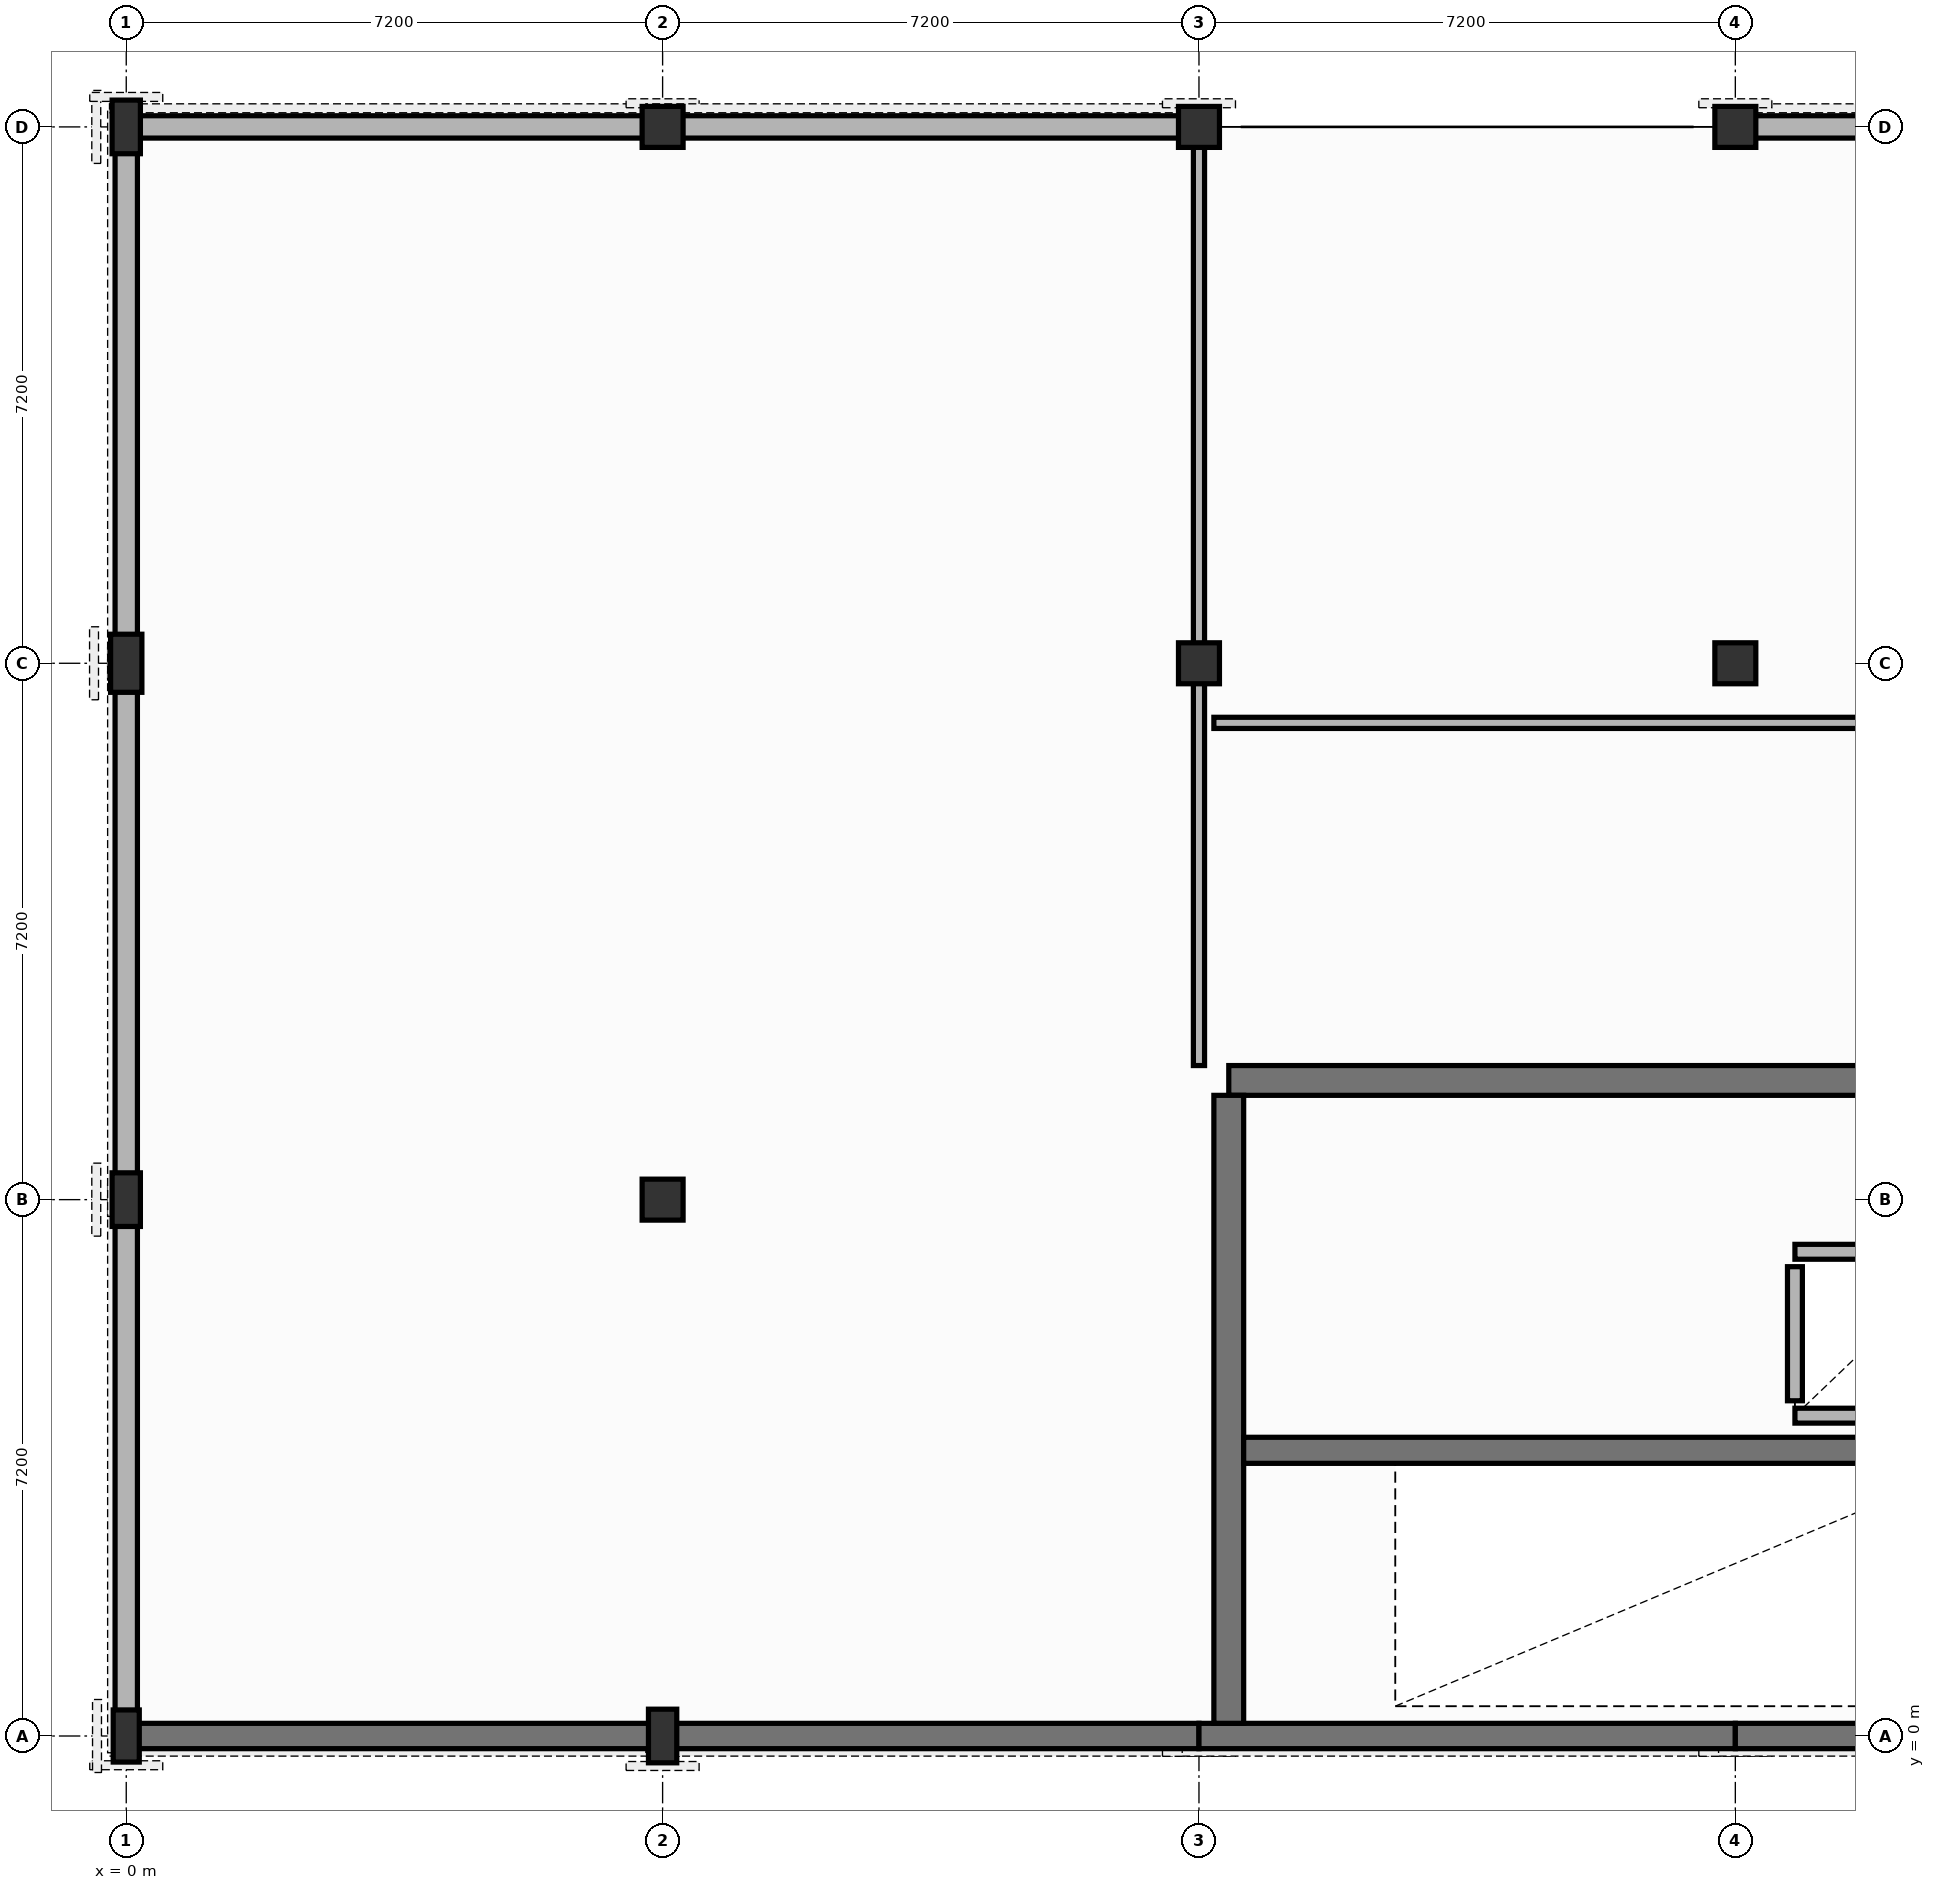
"""IFC4 building model, lengths in metres.
Left out: names, types, materials, properties, quantities, classifications, styles, units other than length and angle.
Written with IfcOpenShell. Run it as: python <this file> out.ifc"""

import sys

from ifc_helpers import new_model, si_unit, direction, frame, frame_2d, origin, origin_with_axes, origin_2d, place, context, subcontext, project, spatial, rectangle, extrude, element, fill, save


model = new_model("IFC4")
c1 = context("Model", 3, precision=1e-05, world=origin(), true_north=direction((0.0, 1.0)))
c2 = subcontext(c1, "Body", "Model", "MODEL_VIEW")
j1 = project(units=[si_unit("LENGTHUNIT", "METRE"), si_unit("PLANEANGLEUNIT", "RADIAN")], contexts=[c1])
p1 = place(None, origin())
s1 = spatial("IfcSite", under=j1, at=p1, CompositionType="ELEMENT")
p2 = place(p1, origin())
s2 = spatial("IfcBuilding", under=s1, at=p2, CompositionType="ELEMENT")
p3 = place(p2, frame((0.0, 0.0, 12.78)))
s3 = spatial("IfcBuildingStorey", under=s2, at=p3, CompositionType="ELEMENT", Elevation=12.78)
p4 = place(p3, frame((0.0, 0.0, 0.0), z_axis=(0.0, 0.0, 1.0), x_axis=(0.0, 1.0, 0.0)))
e1 = element("IfcColumn", 1, at=p4, inside=s3, PredefinedType="PILASTER", context=c2, shape_type="SweptSolid", body=[
    extrude(rectangle(XDim=0.35, YDim=0.7, at=origin_2d()), origin(), (0.0, 0.0, 1.0), 3.74),
])
p5 = place(p3, frame((0.0, 7.2, 0.0), z_axis=(0.0, 0.0, 1.0), x_axis=(1.0, 0.0, 0.0)))
e2 = element("IfcColumn", 2, at=p5, inside=s3, PredefinedType="PILASTER", context=c2, shape_type="SweptSolid", body=[
    extrude(rectangle(XDim=0.38, YDim=0.72, at=origin_2d()), origin(), (0.0, 0.0, 1.0), 3.74),
])
p6 = place(p3, frame((0.0, 14.4, 0.0), z_axis=(0.0, 0.0, 1.0), x_axis=(1.0, 0.0, 0.0)))
e3 = element("IfcColumn", 3, at=p6, inside=s3, PredefinedType="PILASTER", context=c2, shape_type="SweptSolid", body=[
    extrude(rectangle(XDim=0.42, YDim=0.78, at=origin_2d()), origin(), (0.0, 0.0, 1.0), 3.74),
])
for number, where, z_axis, x_axis in (
    (4, (0.0, 21.6, 0.0), (0.0, 0.0, 1.0), (1.0, 0.0, 0.0)),
    (5, (7.2, 0.0, 0.0), (0.0, 0.0, 1.0), (0.0, 1.0, 0.0)),
):
    element("IfcColumn", number, at=place(p3, frame(where, z_axis=z_axis, x_axis=x_axis)), inside=s3, PredefinedType="PILASTER", context=c2, shape_type="SweptSolid", body=[
        extrude(rectangle(XDim=0.38, YDim=0.72, at=origin_2d()), origin(), (0.0, 0.0, 1.0), 3.74),
    ])
for number, where, z_axis, x_axis in (
    (6, (7.2, 7.2, 0.0), (0.0, 0.0, 1.0), (1.0, 0.0, 0.0)),
    (7, (7.2, 21.6, 0.0), (0.0, 0.0, 1.0), (1.0, 0.0, 0.0)),
    (8, (14.4, 14.4, 0.0), (0.0, 0.0, 1.0), (1.0, 0.0, 0.0)),
    (9, (14.4, 21.6, 0.0), (0.0, 0.0, 1.0), (1.0, 0.0, 0.0)),
    (10, (21.6, 14.4, 0.0), (0.0, 0.0, 1.0), (1.0, 0.0, 0.0)),
    (11, (21.6, 21.6, 0.0), (0.0, 0.0, 1.0), (1.0, 0.0, 0.0)),
):
    element("IfcColumn", number, at=place(p3, frame(where, z_axis=z_axis, x_axis=x_axis)), inside=s3, PredefinedType="COLUMN", context=c2, shape_type="SweptSolid", body=[
        extrude(rectangle(XDim=0.55, YDim=0.55, at=origin_2d()), origin(), (0.0, 0.0, 1.0), 3.74),
    ])
p7 = place(p3, origin_with_axes())
e12 = element("IfcWall", 12, at=p7, inside=s3, PredefinedType="SOLIDWALL", context=c2, shape_type="SweptSolid", body=[
    extrude(rectangle(XDim=7.2, YDim=0.34, at=frame_2d((3.6, 0.0))), origin(), (0.0, 0.0, 1.0), 3.42),
])
p8 = place(p7, frame((2.0, 0.0, 0.765)))
e13 = element("IfcOpeningElement", 13, at=p8, cuts=e12, PredefinedType="OPENING", context=c2, shape_type="SweptSolid", body=[
    extrude(rectangle(XDim=2.5, YDim=2.0, at=frame_2d((1.25, 1.0))), frame((0.0, 0.18, 0.0), z_axis=(0.0, -1.0, 0.0), x_axis=(1.0, 0.0, 0.0)), (0.0, 0.0, 1.0), 0.36),
])
p9 = place(p3, frame((7.2, 0.0, 0.0), z_axis=(0.0, 0.0, 1.0), x_axis=(1.0, 0.0, 0.0)))
e14 = element("IfcWall", 14, at=p9, inside=s3, PredefinedType="SOLIDWALL", context=c2, shape_type="SweptSolid", body=[
    extrude(rectangle(XDim=7.2, YDim=0.34, at=frame_2d((3.6, 0.0))), origin(), (0.0, 0.0, 1.0), 3.42),
])
p10 = place(p9, frame((2.0, 0.0, 0.85)))
e15 = element("IfcOpeningElement", 15, at=p10, cuts=e14, PredefinedType="OPENING", context=c2, shape_type="SweptSolid", body=[
    extrude(rectangle(XDim=2.5, YDim=2.0, at=frame_2d((1.25, 1.0))), frame((0.0, 0.18, 0.0), z_axis=(0.0, -1.0, 0.0), x_axis=(1.0, 0.0, 0.0)), (0.0, 0.0, 1.0), 0.36),
])
p11 = place(p3, frame((14.4, 0.0, 0.0), z_axis=(0.0, 0.0, 1.0), x_axis=(1.0, 0.0, 0.0)))
e16 = element("IfcWall", 16, at=p11, inside=s3, PredefinedType="SOLIDWALL", context=c2, shape_type="SweptSolid", body=[
    extrude(rectangle(XDim=7.2, YDim=0.34, at=frame_2d((3.6, 0.0))), origin(), (0.0, 0.0, 1.0), 3.42),
])
p12 = place(p11, frame((5.2, 0.0, 1.05)))
e17 = element("IfcOpeningElement", 17, at=p12, cuts=e16, PredefinedType="OPENING", context=c2, shape_type="SweptSolid", body=[
    extrude(rectangle(XDim=1.05, YDim=1.75, at=frame_2d((0.525, 0.875))), frame((0.0, 0.18, 0.0), z_axis=(0.0, -1.0, 0.0), x_axis=(1.0, 0.0, 0.0)), (0.0, 0.0, 1.0), 0.36),
])
p13 = place(p3, frame((21.6, 0.0, 0.0), z_axis=(0.0, 0.0, 1.0), x_axis=(1.0, 0.0, 0.0)))
e18 = element("IfcWall", 18, at=p13, inside=s3, PredefinedType="SOLIDWALL", context=c2, shape_type="SweptSolid", body=[
    extrude(rectangle(XDim=7.2, YDim=0.34, at=frame_2d((3.6, 0.0))), origin(), (0.0, 0.0, 1.0), 3.42),
])
p14 = place(p13, frame((5.2, 0.0, 1.05)))
e19 = element("IfcOpeningElement", 19, at=p14, cuts=e18, PredefinedType="OPENING", context=c2, shape_type="SweptSolid", body=[
    extrude(rectangle(XDim=1.05, YDim=1.75, at=frame_2d((0.525, 0.875))), frame((0.0, 0.18, 0.0), z_axis=(0.0, -1.0, 0.0), x_axis=(1.0, 0.0, 0.0)), (0.0, 0.0, 1.0), 0.36),
])
for number, where, z_axis, x_axis in (
    (20, (0.0, 0.0, 0.0), (0.0, 0.0, 1.0), (0.0, 1.0, 0.0)),
    (21, (0.0, 7.2, 0.0), (0.0, 0.0, 1.0), (0.0, 1.0, 0.0)),
):
    element("IfcWall", number, at=place(p3, frame(where, z_axis=z_axis, x_axis=x_axis)), inside=s3, PredefinedType="SOLIDWALL", context=c2, shape_type="SweptSolid", body=[
        extrude(rectangle(XDim=7.2, YDim=0.3, at=frame_2d((3.6, 0.0))), origin(), (0.0, 0.0, 1.0), 2.805),
    ])
p15 = place(p3, frame((0.0, 14.4, 0.0), z_axis=(0.0, 0.0, 1.0), x_axis=(0.0, 1.0, 0.0)))
e22 = element("IfcWall", 22, at=p15, inside=s3, PredefinedType="SOLIDWALL", context=c2, shape_type="SweptSolid", body=[
    extrude(rectangle(XDim=7.2, YDim=0.3, at=frame_2d((3.6, 0.0))), origin(), (0.0, 0.0, 1.0), 2.805),
])
p16 = place(p3, frame((0.0, 21.6, 0.0), z_axis=(0.0, 0.0, 1.0), x_axis=(1.0, 0.0, 0.0)))
e23 = element("IfcWall", 23, at=p16, inside=s3, PredefinedType="SOLIDWALL", context=c2, shape_type="SweptSolid", body=[
    extrude(rectangle(XDim=7.2, YDim=0.3, at=frame_2d((3.6, 0.0))), origin(), (0.0, 0.0, 1.0), 2.805),
])
p17 = place(p16, frame((2.0, 0.0, 0.635)))
e24 = element("IfcOpeningElement", 24, at=p17, cuts=e23, PredefinedType="OPENING", context=c2, shape_type="SweptSolid", body=[
    extrude(rectangle(XDim=1.6, YDim=2.05, at=frame_2d((0.8, 1.025))), frame((0.0, 0.16, 0.0), z_axis=(0.0, -1.0, 0.0), x_axis=(1.0, 0.0, 0.0)), (0.0, 0.0, 1.0), 0.32),
])
p18 = place(p3, frame((7.2, 21.6, 0.0), z_axis=(0.0, 0.0, 1.0), x_axis=(1.0, 0.0, 0.0)))
e25 = element("IfcWall", 25, at=p18, inside=s3, PredefinedType="SOLIDWALL", context=c2, shape_type="SweptSolid", body=[
    extrude(rectangle(XDim=7.2, YDim=0.3, at=frame_2d((3.6, 0.0))), origin(), (0.0, 0.0, 1.0), 2.805),
])
p19 = place(p18, frame((2.0, 0.0, 0.635)))
e26 = element("IfcOpeningElement", 26, at=p19, cuts=e25, PredefinedType="OPENING", context=c2, shape_type="SweptSolid", body=[
    extrude(rectangle(XDim=1.6, YDim=2.05, at=frame_2d((0.8, 1.025))), frame((0.0, 0.16, 0.0), z_axis=(0.0, -1.0, 0.0), x_axis=(1.0, 0.0, 0.0)), (0.0, 0.0, 1.0), 0.32),
])
p20 = place(p3, frame((21.6, 21.6, 0.0), z_axis=(0.0, 0.0, 1.0), x_axis=(1.0, 0.0, 0.0)))
e27 = element("IfcWall", 27, at=p20, inside=s3, PredefinedType="SOLIDWALL", context=c2, shape_type="SweptSolid", body=[
    extrude(rectangle(XDim=7.2, YDim=0.3, at=frame_2d((3.6, 0.0))), origin(), (0.0, 0.0, 1.0), 2.805),
])
p21 = place(p20, frame((2.0, 0.0, 0.635)))
e28 = element("IfcOpeningElement", 28, at=p21, cuts=e27, PredefinedType="OPENING", context=c2, shape_type="SweptSolid", body=[
    extrude(rectangle(XDim=1.6, YDim=2.05, at=frame_2d((0.8, 1.025))), frame((0.0, 0.16, 0.0), z_axis=(0.0, -1.0, 0.0), x_axis=(1.0, 0.0, 0.0)), (0.0, 0.0, 1.0), 0.32),
])
p22 = place(p3, frame((14.8, 8.8, 0.0), z_axis=(0.0, 0.0, 1.0), x_axis=(1.0, 0.0, 0.0)))
e29 = element("IfcWall", 29, at=p22, inside=s3, PredefinedType="SHEAR", context=c2, shape_type="SweptSolid", body=[
    extrude(rectangle(XDim=10.4, YDim=0.4, at=frame_2d((5.2, 0.0))), origin(), (0.0, 0.0, 1.0), 3.42),
])
p23 = place(p22, frame((2.4, 0.0, 0.0)))
e30 = element("IfcOpeningElement", 30, at=p23, cuts=e29, PredefinedType="OPENING", context=c2, shape_type="SweptSolid", body=[
    extrude(rectangle(XDim=1.5, YDim=2.2, at=frame_2d((0.75, 1.1))), frame((0.0, 0.21, 0.0), z_axis=(0.0, -1.0, 0.0), x_axis=(1.0, 0.0, 0.0)), (0.0, 0.0, 1.0), 0.42),
])
p24 = place(p3, frame((14.8, 0.17, 0.0), z_axis=(0.0, 0.0, 1.0), x_axis=(0.0, 1.0, 0.0)))
e31 = element("IfcWall", 31, at=p24, inside=s3, PredefinedType="SHEAR", context=c2, shape_type="SweptSolid", body=[
    extrude(rectangle(XDim=8.43, YDim=0.4, at=frame_2d((4.215, 0.0))), origin(), (0.0, 0.0, 1.0), 3.42),
])
p25 = place(p3, frame((15.0, 3.835, 0.0), z_axis=(0.0, 0.0, 1.0), x_axis=(1.0, 0.0, 0.0)))
e32 = element("IfcWall", 32, at=p25, inside=s3, PredefinedType="SHEAR", context=c2, shape_type="SweptSolid", body=[
    extrude(rectangle(XDim=10.0, YDim=0.35, at=frame_2d((5.0, 0.0))), origin(), (0.0, 0.0, 1.0), 3.42),
])
p26 = place(p25, frame((0.45, 0.0, 0.0)))
e33 = element("IfcOpeningElement", 33, at=p26, cuts=e32, PredefinedType="OPENING", context=c2, shape_type="SweptSolid", body=[
    extrude(rectangle(XDim=1.05, YDim=2.2, at=frame_2d((0.525, 1.1))), frame((0.0, 0.185, 0.0), z_axis=(0.0, -1.0, 0.0), x_axis=(1.0, 0.0, 0.0)), (0.0, 0.0, 1.0), 0.37),
])
for number, where, z_axis, x_axis in (
    (34, (22.4, 4.3, 0.0), (0.0, 0.0, 1.0), (1.0, 0.0, 0.0)),
    (35, (22.4, 6.5, 0.0), (0.0, 0.0, 1.0), (1.0, 0.0, 0.0)),
):
    element("IfcWall", number, at=place(p3, frame(where, z_axis=z_axis, x_axis=x_axis)), inside=s3, PredefinedType="PARTITIONING", context=c2, shape_type="SweptSolid", body=[
        extrude(rectangle(XDim=2.3, YDim=0.2, at=frame_2d((1.15, 0.0))), origin(), (0.0, 0.0, 1.0), 3.42),
    ])
p27 = place(p3, frame((22.4, 4.5, 0.0), z_axis=(0.0, 0.0, 1.0), x_axis=(0.0, 1.0, 0.0)))
e36 = element("IfcWall", 36, at=p27, inside=s3, PredefinedType="PARTITIONING", context=c2, shape_type="SweptSolid", body=[
    extrude(rectangle(XDim=1.8, YDim=0.2, at=frame_2d((0.9, 0.0))), origin(), (0.0, 0.0, 1.0), 3.42),
])
p28 = place(p27, frame((0.45, 0.0, 0.0)))
e37 = element("IfcOpeningElement", 37, at=p28, cuts=e36, PredefinedType="OPENING", context=c2, shape_type="SweptSolid", body=[
    extrude(rectangle(XDim=0.9, YDim=2.1, at=frame_2d((0.45, 1.05))), frame((0.0, 0.11, 0.0), z_axis=(0.0, -1.0, 0.0), x_axis=(1.0, 0.0, 0.0)), (0.0, 0.0, 1.0), 0.22),
])
p29 = place(p3, frame((14.4, 9.0, 0.0), z_axis=(0.0, 0.0, 1.0), x_axis=(0.0, 1.0, 0.0)))
e38 = element("IfcWall", 38, at=p29, inside=s3, PredefinedType="PARTITIONING", context=c2, shape_type="SweptSolid", body=[
    extrude(rectangle(XDim=12.6, YDim=0.15, at=frame_2d((6.3, 0.0))), origin(), (0.0, 0.0, 1.0), 2.685),
])
p30 = place(p29, frame((8.4, 0.0, 0.0)))
e39 = element("IfcOpeningElement", 39, at=p30, cuts=e38, PredefinedType="OPENING", context=c2, shape_type="SweptSolid", body=[
    extrude(rectangle(XDim=1.0, YDim=2.15, at=frame_2d((0.5, 1.075))), frame((0.0, 0.085, 0.0), z_axis=(0.0, -1.0, 0.0), x_axis=(1.0, 0.0, 0.0)), (0.0, 0.0, 1.0), 0.17),
])
p31 = place(p3, frame((14.6, 13.6, 0.0), z_axis=(0.0, 0.0, 1.0), x_axis=(1.0, 0.0, 0.0)))
e40 = element("IfcWall", 40, at=p31, inside=s3, PredefinedType="PARTITIONING", context=c2, shape_type="SweptSolid", body=[
    extrude(rectangle(XDim=14.2, YDim=0.15, at=frame_2d((7.1, 0.0))), origin(), (0.0, 0.0, 1.0), 3.42),
])
p32 = place(p31, frame((3.0, 0.0, 0.0)))
e41 = element("IfcOpeningElement", 41, at=p32, cuts=e40, PredefinedType="OPENING", context=c2, shape_type="SweptSolid", body=[
    extrude(rectangle(XDim=1.0, YDim=2.15, at=frame_2d((0.5, 1.075))), frame((0.0, 0.085, 0.0), z_axis=(0.0, -1.0, 0.0), x_axis=(1.0, 0.0, 0.0)), (0.0, 0.0, 1.0), 0.17),
])
p33 = place(p8, origin())
e42 = element("IfcWindow", 42, at=p33, inside=s3, PartitioningType="SINGLE_PANEL", PredefinedType="WINDOW", context=c2, shape_type="SweptSolid", body=[
    extrude(rectangle(XDim=2.5, YDim=2.0, at=frame_2d((1.25, 1.0))), frame((0.0, 0.03, 0.0), z_axis=(0.0, -1.0, 0.0), x_axis=(1.0, 0.0, 0.0)), (0.0, 0.0, 1.0), 0.06),
])
fill(e13, e42)
p34 = place(p10, origin())
e43 = element("IfcWindow", 43, at=p34, inside=s3, PartitioningType="SINGLE_PANEL", PredefinedType="WINDOW", context=c2, shape_type="SweptSolid", body=[
    extrude(rectangle(XDim=2.5, YDim=2.0, at=frame_2d((1.25, 1.0))), frame((0.0, 0.03, 0.0), z_axis=(0.0, -1.0, 0.0), x_axis=(1.0, 0.0, 0.0)), (0.0, 0.0, 1.0), 0.06),
])
fill(e15, e43)
p35 = place(p12, origin())
e44 = element("IfcWindow", 44, at=p35, inside=s3, PartitioningType="SINGLE_PANEL", PredefinedType="WINDOW", context=c2, shape_type="SweptSolid", body=[
    extrude(rectangle(XDim=1.05, YDim=1.75, at=frame_2d((0.525, 0.875))), frame((0.0, 0.03, 0.0), z_axis=(0.0, -1.0, 0.0), x_axis=(1.0, 0.0, 0.0)), (0.0, 0.0, 1.0), 0.06),
])
fill(e17, e44)
p36 = place(p17, origin())
e45 = element("IfcWindow", 45, at=p36, inside=s3, PartitioningType="SINGLE_PANEL", PredefinedType="WINDOW", context=c2, shape_type="SweptSolid", body=[
    extrude(rectangle(XDim=1.6, YDim=2.05, at=frame_2d((0.8, 1.025))), frame((0.0, 0.03, 0.0), z_axis=(0.0, -1.0, 0.0), x_axis=(1.0, 0.0, 0.0)), (0.0, 0.0, 1.0), 0.06),
])
fill(e24, e45)
p37 = place(p19, origin())
e46 = element("IfcWindow", 46, at=p37, inside=s3, PartitioningType="SINGLE_PANEL", PredefinedType="WINDOW", context=c2, shape_type="SweptSolid", body=[
    extrude(rectangle(XDim=1.6, YDim=2.05, at=frame_2d((0.8, 1.025))), frame((0.0, 0.03, 0.0), z_axis=(0.0, -1.0, 0.0), x_axis=(1.0, 0.0, 0.0)), (0.0, 0.0, 1.0), 0.06),
])
fill(e26, e46)
p38 = place(p23, origin())
e47 = element("IfcDoor", 47, at=p38, inside=s3, OperationType="DOUBLE_DOOR_SINGLE_SWING", PredefinedType="DOOR", context=c2, shape_type="SweptSolid", body=[
    extrude(rectangle(XDim=1.5, YDim=2.2, at=frame_2d((0.75, 1.1))), frame((0.0, 0.025, 0.0), z_axis=(0.0, -1.0, 0.0), x_axis=(1.0, 0.0, 0.0)), (0.0, 0.0, 1.0), 0.05),
])
fill(e30, e47)
p39 = place(p26, origin())
e48 = element("IfcDoor", 48, at=p39, inside=s3, OperationType="SINGLE_SWING_RIGHT", PredefinedType="DOOR", context=c2, shape_type="SweptSolid", body=[
    extrude(rectangle(XDim=1.05, YDim=2.2, at=frame_2d((0.525, 1.1))), frame((0.0, 0.025, 0.0), z_axis=(0.0, -1.0, 0.0), x_axis=(1.0, 0.0, 0.0)), (0.0, 0.0, 1.0), 0.05),
])
fill(e33, e48)
p40 = place(p28, origin())
e49 = element("IfcDoor", 49, at=p40, inside=s3, OperationType="SINGLE_SWING_LEFT", PredefinedType="DOOR", context=c2, shape_type="SweptSolid", body=[
    extrude(rectangle(XDim=0.9, YDim=2.1, at=frame_2d((0.45, 1.05))), frame((0.0, 0.025, 0.0), z_axis=(0.0, -1.0, 0.0), x_axis=(1.0, 0.0, 0.0)), (0.0, 0.0, 1.0), 0.05),
])
fill(e37, e49)
p41 = place(p30, origin())
e50 = element("IfcDoor", 50, at=p41, inside=s3, OperationType="SINGLE_SWING_LEFT", PredefinedType="DOOR", context=c2, shape_type="SweptSolid", body=[
    extrude(rectangle(XDim=1.0, YDim=2.15, at=frame_2d((0.5, 1.075))), frame((0.0, 0.025, 0.0), z_axis=(0.0, -1.0, 0.0), x_axis=(1.0, 0.0, 0.0)), (0.0, 0.0, 1.0), 0.05),
])
fill(e39, e50)
p42 = place(p32, origin())
e51 = element("IfcDoor", 51, at=p42, inside=s3, OperationType="SINGLE_SWING_RIGHT", PredefinedType="DOOR", context=c2, shape_type="SweptSolid", body=[
    extrude(rectangle(XDim=1.0, YDim=2.15, at=frame_2d((0.5, 1.075))), frame((0.0, 0.025, 0.0), z_axis=(0.0, -1.0, 0.0), x_axis=(1.0, 0.0, 0.0)), (0.0, 0.0, 1.0), 0.05),
])
fill(e41, e51)
save(model, sys.argv[1])
